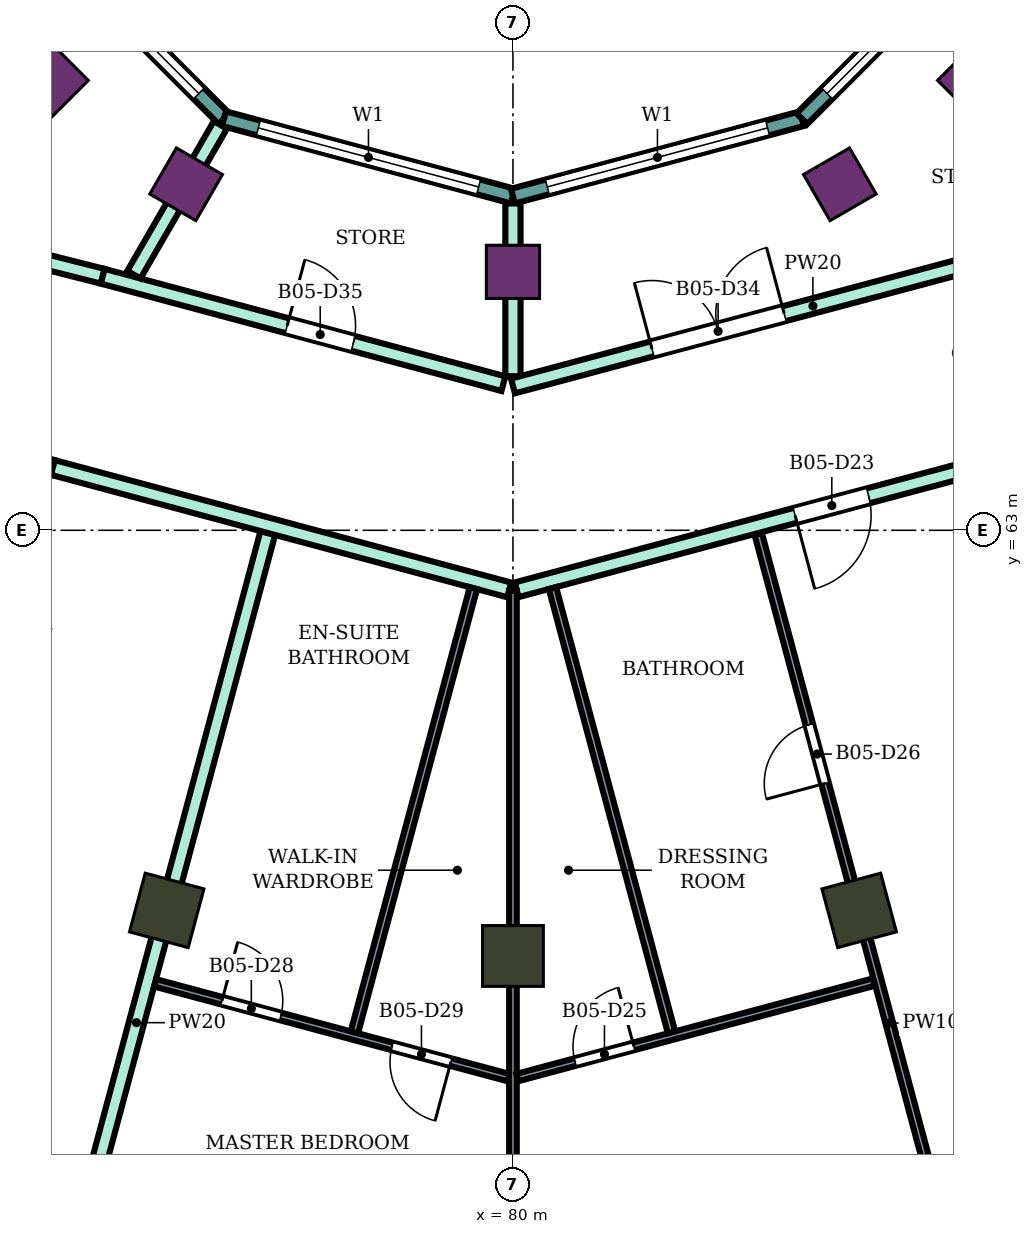
"""IFC4 building model, lengths in metres.
Left out: names, types, materials, properties, quantities, classifications, styles, units other than length and angle.
Written with IfcOpenShell. Run it as: python <this file> out.ifc"""

import sys

from ifc_helpers import new_model, si_unit, direction, frame, frame_2d, origin, origin_2d, place, context, subcontext, project, spatial, rectangle, extrude, element, fill, save


model = new_model("IFC4")
c1 = context("Model", 3, precision=1e-05, world=origin(), true_north=direction((0.0, 1.0)))
c2 = subcontext(c1, "Body", "Model", "MODEL_VIEW")
j1 = project(units=[si_unit("LENGTHUNIT", "METRE"), si_unit("PLANEANGLEUNIT", "RADIAN")], contexts=[c1])
p1 = place(None, origin())
s1 = spatial("IfcSite", under=j1, at=p1, CompositionType="ELEMENT")
p2 = place(p1, origin())
s2 = spatial("IfcBuilding", under=s1, at=p2, CompositionType="ELEMENT")
p3 = place(p2, frame((0.0, 0.0, 262.5)))
s3 = spatial("IfcBuildingStorey", under=s2, at=p3, CompositionType="ELEMENT", Elevation=262.5)
for number, where, z_axis, x_axis in (
    (1, (75.445, 58.0, 0.0), (0.0, 0.0, 1.0), (-0.259, -0.966, 0.0)),
    (2, (80.0, 57.4, 0.0), (0.0, 0.0, 1.0), (0.0, -1.0, 0.0)),
    (3, (84.555, 58.0, 0.0), (0.0, 0.0, 1.0), (0.259, -0.966, 0.0)),
):
    element("IfcColumn", number, at=place(p3, frame(where, z_axis=z_axis, x_axis=x_axis)), inside=s3, PredefinedType="COLUMN", context=c2, shape_type="SweptSolid", body=[
        extrude(rectangle(XDim=0.8, YDim=0.8, at=origin_2d()), origin(), (0.0, 0.0, 1.0), 4.2),
    ])
for number, where, z_axis, x_axis in (
    (4, (73.919, 68.919, 0.0), (0.0, 0.0, 1.0), (-0.707, -0.707, 0.0)),
    (5, (75.7, 67.552, 0.0), (0.0, 0.0, 1.0), (-0.5, -0.866, 0.0)),
    (6, (80.0, 66.4, 0.0), (0.0, 0.0, 1.0), (0.0, -1.0, 0.0)),
    (7, (84.3, 67.552, 0.0), (0.0, 0.0, 1.0), (0.5, -0.866, 0.0)),
    (8, (86.081, 68.919, 0.0), (0.0, 0.0, 1.0), (0.707, -0.707, 0.0)),
):
    element("IfcColumn", number, at=place(p3, frame(where, z_axis=z_axis, x_axis=x_axis)), inside=s3, PredefinedType="COLUMN", context=c2, shape_type="SweptSolid", body=[
        extrude(rectangle(XDim=0.7, YDim=0.7, at=origin_2d()), origin(), (0.0, 0.0, 1.0), 4.2),
    ])
p4 = place(p3, frame((73.415, 71.198, 0.0), z_axis=(0.0, 0.0, 1.0), x_axis=(0.707106781187, -0.707106781187, 0.0)))
e9 = element("IfcWall", 9, at=p4, inside=s3, PredefinedType="NOTDEFINED", context=c2, shape_type="SweptSolid", body=[
    extrude(rectangle(XDim=3.936, YDim=0.2, at=frame_2d((1.968, 0.0))), origin(), (0.0, 0.0, 1.0), 4.2),
])
p5 = place(p4, frame((0.468, 0.0, 0.9)))
e10 = element("IfcOpeningElement", 10, at=p5, cuts=e9, PredefinedType="OPENING", context=c2, shape_type="SweptSolid", body=[
    extrude(rectangle(XDim=3.0, YDim=2.3, at=frame_2d((1.5, 1.15))), frame((0.0, 0.11, 0.0), z_axis=(0.0, -1.0, 0.0), x_axis=(1.0, 0.0, 0.0)), (0.0, 0.0, 1.0), 0.22),
])
p6 = place(p3, frame((76.198, 68.415, 0.0), z_axis=(0.0, 0.0, 1.0), x_axis=(0.965933654434, -0.258789828301, 0.0)))
e11 = element("IfcWall", 11, at=p6, inside=s3, PredefinedType="NOTDEFINED", context=c2, shape_type="SweptSolid", body=[
    extrude(rectangle(XDim=3.936, YDim=0.2, at=frame_2d((1.968, 0.0))), origin(), (0.0, 0.0, 1.0), 4.2),
])
p7 = place(p6, frame((0.468, 0.0, 0.9)))
e12 = element("IfcOpeningElement", 12, at=p7, cuts=e11, PredefinedType="OPENING", context=c2, shape_type="SweptSolid", body=[
    extrude(rectangle(XDim=3.0, YDim=2.3, at=frame_2d((1.5, 1.15))), frame((0.0, 0.11, 0.0), z_axis=(0.0, -1.0, 0.0), x_axis=(1.0, 0.0, 0.0)), (0.0, 0.0, 1.0), 0.22),
])
p8 = place(p3, frame((80.0, 67.396, 0.0), z_axis=(0.0, 0.0, 1.0), x_axis=(0.965933654434, 0.258789828301, 0.0)))
e13 = element("IfcWall", 13, at=p8, inside=s3, PredefinedType="NOTDEFINED", context=c2, shape_type="SweptSolid", body=[
    extrude(rectangle(XDim=3.936, YDim=0.2, at=frame_2d((1.968, 0.0))), origin(), (0.0, 0.0, 1.0), 4.2),
])
p9 = place(p8, frame((0.468, 0.0, 0.9)))
e14 = element("IfcOpeningElement", 14, at=p9, cuts=e13, PredefinedType="OPENING", context=c2, shape_type="SweptSolid", body=[
    extrude(rectangle(XDim=3.0, YDim=2.3, at=frame_2d((1.5, 1.15))), frame((0.0, 0.11, 0.0), z_axis=(0.0, -1.0, 0.0), x_axis=(1.0, 0.0, 0.0)), (0.0, 0.0, 1.0), 0.22),
])
p10 = place(p3, frame((83.802, 68.415, 0.0), z_axis=(0.0, 0.0, 1.0), x_axis=(0.707106781187, 0.707106781187, 0.0)))
e15 = element("IfcWall", 15, at=p10, inside=s3, PredefinedType="NOTDEFINED", context=c2, shape_type="SweptSolid", body=[
    extrude(rectangle(XDim=3.936, YDim=0.2, at=frame_2d((1.968, 0.0))), origin(), (0.0, 0.0, 1.0), 4.2),
])
p11 = place(p10, frame((0.468, 0.0, 0.9)))
e16 = element("IfcOpeningElement", 16, at=p11, cuts=e15, PredefinedType="OPENING", context=c2, shape_type="SweptSolid", body=[
    extrude(rectangle(XDim=3.0, YDim=2.3, at=frame_2d((1.5, 1.15))), frame((0.0, 0.11, 0.0), z_axis=(0.0, -1.0, 0.0), x_axis=(1.0, 0.0, 0.0)), (0.0, 0.0, 1.0), 0.22),
])
p12 = place(p3, frame((68.2, 65.28, 0.0), z_axis=(0.0, 0.0, 1.0), x_axis=(0.969428528216, -0.245373854926, 0.0)))
e17 = element("IfcWall", 17, at=p12, inside=s3, PredefinedType="PARTITIONING", context=c2, shape_type="SweptSolid", body=[
    extrude(rectangle(XDim=5.928, YDim=0.2, at=frame_2d((2.964, 0.0))), origin(), (0.0, 0.0, 1.0), 3.75),
])
p13 = place(p12, frame((3.309, 0.0, 0.0)))
e18 = element("IfcOpeningElement", 18, at=p13, cuts=e17, PredefinedType="OPENING", context=c2, shape_type="SweptSolid", body=[
    extrude(rectangle(XDim=1.0, YDim=2.1, at=frame_2d((0.5, 1.05))), frame((0.0, 0.11, 0.0), z_axis=(0.0, -1.0, 0.0), x_axis=(1.0, 0.0, 0.0)), (0.0, 0.0, 1.0), 0.22),
])
p14 = place(p3, frame((72.1, 66.975, 0.0), z_axis=(0.0, 0.0, 1.0), x_axis=(0.969471314457, -0.245204752086, 0.0)))
e19 = element("IfcWall", 19, at=p14, inside=s3, PredefinedType="PARTITIONING", context=c2, shape_type="SweptSolid", body=[
    extrude(rectangle(XDim=2.582, YDim=0.2, at=frame_2d((1.291, 0.0))), origin(), (0.0, 0.0, 1.0), 3.75),
])
p15 = place(p14, frame((0.841, 0.0, 0.0)))
e20 = element("IfcOpeningElement", 20, at=p15, cuts=e19, PredefinedType="OPENING", context=c2, shape_type="SweptSolid", body=[
    extrude(rectangle(XDim=0.9, YDim=2.1, at=frame_2d((0.45, 1.05))), frame((0.0, 0.11, 0.0), z_axis=(0.0, -1.0, 0.0), x_axis=(1.0, 0.0, 0.0)), (0.0, 0.0, 1.0), 0.22),
])
p16 = place(p3, frame((73.32, 50.082, 0.0), z_axis=(0.0, 0.0, 1.0), x_axis=(0.258966962665, 0.965886179758, 0.0)))
e21 = element("IfcWall", 21, at=p16, inside=s3, PredefinedType="PARTITIONING", context=c2, shape_type="SweptSolid", body=[
    extrude(rectangle(XDim=13.337, YDim=0.2, at=frame_2d((6.668, 0.0))), origin(), (0.0, 0.0, 1.0), 3.75),
])
p17 = place(p3, frame((73.947, 63.826, 0.0), z_axis=(0.0, 0.0, 1.0), x_axis=(0.965856500469, -0.259077634122, 0.0)))
e22 = element("IfcWall", 22, at=p17, inside=s3, PredefinedType="PARTITIONING", context=c2, shape_type="SweptSolid", body=[
    extrude(rectangle(XDim=6.217, YDim=0.2, at=frame_2d((3.108, 0.0))), origin(), (0.0, 0.0, 1.0), 3.75),
])
p18 = place(p3, frame((74.603, 66.342, 0.0), z_axis=(0.0, 0.0, 1.0), x_axis=(0.965920893652, -0.258837453254, 0.0)))
e23 = element("IfcWall", 23, at=p18, inside=s3, PredefinedType="PARTITIONING", context=c2, shape_type="SweptSolid", body=[
    extrude(rectangle(XDim=5.458, YDim=0.2, at=frame_2d((2.729, 0.0))), origin(), (0.0, 0.0, 1.0), 3.75),
])
p19 = place(p18, frame((2.512, 0.0, 0.0)))
e24 = element("IfcOpeningElement", 24, at=p19, cuts=e23, PredefinedType="OPENING", context=c2, shape_type="SweptSolid", body=[
    extrude(rectangle(XDim=0.9, YDim=2.1, at=frame_2d((0.45, 1.05))), frame((0.0, 0.11, 0.0), z_axis=(0.0, -1.0, 0.0), x_axis=(1.0, 0.0, 0.0)), (0.0, 0.0, 1.0), 0.22),
])
p20 = place(p3, frame((75.013, 66.363, 0.0), z_axis=(0.0, 0.0, 1.0), x_axis=(0.500097042406, 0.865969369075, 0.0)))
e25 = element("IfcWall", 25, at=p20, inside=s3, PredefinedType="PARTITIONING", context=c2, shape_type="SweptSolid", body=[
    extrude(rectangle(XDim=2.275, YDim=0.2, at=frame_2d((1.138, 0.0))), origin(), (0.0, 0.0, 1.0), 3.75),
])
p21 = place(p3, frame((80.048, 62.217, 0.0), z_axis=(0.0, 0.0, 1.0), x_axis=(0.966097920642, 0.258175923996, 0.0)))
e26 = element("IfcWall", 26, at=p21, inside=s3, PredefinedType="PARTITIONING", context=c2, shape_type="SweptSolid", body=[
    extrude(rectangle(XDim=6.217, YDim=0.2, at=frame_2d((3.108, 0.0))), origin(), (0.0, 0.0, 1.0), 3.75),
])
p22 = place(p21, frame((3.792, 0.0, 0.0)))
e27 = element("IfcOpeningElement", 27, at=p22, cuts=e26, PredefinedType="OPENING", context=c2, shape_type="SweptSolid", body=[
    extrude(rectangle(XDim=1.0, YDim=2.1, at=frame_2d((0.5, 1.05))), frame((0.0, 0.11, 0.0), z_axis=(0.0, -1.0, 0.0), x_axis=(1.0, 0.0, 0.0)), (0.0, 0.0, 1.0), 0.22),
])
p23 = place(p3, frame((80.0, 65.027, 0.0), z_axis=(0.0, 0.0, 1.0), x_axis=(0.0, 1.0, 0.0)))
e28 = element("IfcWall", 28, at=p23, inside=s3, PredefinedType="PARTITIONING", context=c2, shape_type="SweptSolid", body=[
    extrude(rectangle(XDim=2.273, YDim=0.2, at=frame_2d((1.136, 0.0))), origin(), (0.0, 0.0, 1.0), 3.75),
])
p24 = place(p3, frame((80.0, 64.898, 0.0), z_axis=(0.0, 0.0, 1.0), x_axis=(0.966236923997, 0.25765520896, 0.0)))
e29 = element("IfcWall", 29, at=p24, inside=s3, PredefinedType="PARTITIONING", context=c2, shape_type="SweptSolid", body=[
    extrude(rectangle(XDim=8.168, YDim=0.2, at=frame_2d((4.084, 0.0))), origin(), (0.0, 0.0, 1.0), 3.75),
])
p25 = place(p24, frame((1.893, 0.0, 0.0)))
e30 = element("IfcOpeningElement", 30, at=p25, cuts=e29, PredefinedType="OPENING", context=c2, shape_type="SweptSolid", body=[
    extrude(rectangle(XDim=1.8, YDim=2.1, at=frame_2d((0.9, 1.05))), frame((0.0, 0.11, 0.0), z_axis=(0.0, -1.0, 0.0), x_axis=(1.0, 0.0, 0.0)), (0.0, 0.0, 1.0), 0.22),
])
p26 = place(p3, frame((75.293, 57.046, 0.0), z_axis=(0.0, 0.0, 1.0), x_axis=(0.965904119246, -0.258900043306, 0.0)))
e31 = element("IfcWall", 31, at=p26, inside=s3, PredefinedType="PARTITIONING", context=c2, shape_type="SweptSolid", body=[
    extrude(rectangle(XDim=4.813, YDim=0.1, at=frame_2d((2.406, 0.0))), origin(), (0.0, 0.0, 1.0), 3.75),
])
p27 = place(p26, frame((0.91, 0.0, 0.0)))
e32 = element("IfcOpeningElement", 32, at=p27, cuts=e31, PredefinedType="OPENING", context=c2, shape_type="SweptSolid", body=[
    extrude(rectangle(XDim=0.8, YDim=2.1, at=frame_2d((0.4, 1.05))), frame((0.0, 0.06, 0.0), z_axis=(0.0, -1.0, 0.0), x_axis=(1.0, 0.0, 0.0)), (0.0, 0.0, 1.0), 0.12),
])
p28 = place(p26, frame((3.227, 0.0, 0.0)))
e33 = element("IfcOpeningElement", 33, at=p28, cuts=e31, PredefinedType="OPENING", context=c2, shape_type="SweptSolid", body=[
    extrude(rectangle(XDim=0.8, YDim=2.1, at=frame_2d((0.4, 1.05))), frame((0.0, 0.06, 0.0), z_axis=(0.0, -1.0, 0.0), x_axis=(1.0, 0.0, 0.0)), (0.0, 0.0, 1.0), 0.12),
])
p29 = place(p3, frame((77.914, 56.396, 0.0), z_axis=(0.0, 0.0, 1.0), x_axis=(0.258822816874, 0.965924815638, 0.0)))
e34 = element("IfcWall", 34, at=p29, inside=s3, PredefinedType="PARTITIONING", context=c2, shape_type="SweptSolid", body=[
    extrude(rectangle(XDim=6.05, YDim=0.1, at=frame_2d((3.025, 0.0))), origin(), (0.0, 0.0, 1.0), 3.75),
])
p30 = place(p3, frame((80.0, 51.8, 0.0), z_axis=(0.0, 0.0, 1.0), x_axis=(0.0, 1.0, 0.0)))
e35 = element("IfcWall", 35, at=p30, inside=s3, PredefinedType="PARTITIONING", context=c2, shape_type="SweptSolid", body=[
    extrude(rectangle(XDim=10.404, YDim=0.1, at=frame_2d((5.202, 0.0))), origin(), (0.0, 0.0, 1.0), 3.75),
])
p31 = place(p30, frame((1.718, 0.0, 0.0)))
e36 = element("IfcOpeningElement", 36, at=p31, cuts=e35, PredefinedType="OPENING", context=c2, shape_type="SweptSolid", body=[
    extrude(rectangle(XDim=0.9, YDim=2.1, at=frame_2d((0.45, 1.05))), frame((0.0, 0.06, 0.0), z_axis=(0.0, -1.0, 0.0), x_axis=(1.0, 0.0, 0.0)), (0.0, 0.0, 1.0), 0.12),
])
p32 = place(p3, frame((80.058, 55.801, 0.0), z_axis=(0.0, 0.0, 1.0), x_axis=(0.965968926881, 0.258658137896, 0.0)))
e37 = element("IfcWall", 37, at=p32, inside=s3, PredefinedType="PARTITIONING", context=c2, shape_type="SweptSolid", body=[
    extrude(rectangle(XDim=4.854, YDim=0.1, at=frame_2d((2.427, 0.0))), origin(), (0.0, 0.0, 1.0), 3.75),
])
p33 = place(p32, frame((0.786, 0.0, 0.0)))
e38 = element("IfcOpeningElement", 38, at=p33, cuts=e37, PredefinedType="OPENING", context=c2, shape_type="SweptSolid", body=[
    extrude(rectangle(XDim=0.8, YDim=2.1, at=frame_2d((0.4, 1.05))), frame((0.0, 0.06, 0.0), z_axis=(0.0, -1.0, 0.0), x_axis=(1.0, 0.0, 0.0)), (0.0, 0.0, 1.0), 0.12),
])
p34 = place(p3, frame((80.52, 62.24, 0.0), z_axis=(0.0, 0.0, 1.0), x_axis=(0.258822816874, -0.965924815638, 0.0)))
e39 = element("IfcWall", 39, at=p34, inside=s3, PredefinedType="PARTITIONING", context=c2, shape_type="SweptSolid", body=[
    extrude(rectangle(XDim=6.05, YDim=0.1, at=frame_2d((3.025, 0.0))), origin(), (0.0, 0.0, 1.0), 3.75),
])
p35 = place(p3, frame((83.226, 62.954, 0.0), z_axis=(0.0, 0.0, 1.0), x_axis=(0.258737611245, -0.965947642746, 0.0)))
e40 = element("IfcWall", 40, at=p35, inside=s3, PredefinedType="PARTITIONING", context=c2, shape_type="SweptSolid", body=[
    extrude(rectangle(XDim=13.328, YDim=0.1, at=frame_2d((6.664, 0.0))), origin(), (0.0, 0.0, 1.0), 3.75),
])
p36 = place(p35, frame((9.634, 0.0, 0.0)))
e41 = element("IfcOpeningElement", 41, at=p36, cuts=e40, PredefinedType="OPENING", context=c2, shape_type="SweptSolid", body=[
    extrude(rectangle(XDim=0.9, YDim=2.1, at=frame_2d((0.45, 1.05))), frame((0.0, 0.06, 0.0), z_axis=(0.0, -1.0, 0.0), x_axis=(1.0, 0.0, 0.0)), (0.0, 0.0, 1.0), 0.12),
])
p37 = place(p35, frame((2.6, 0.0, 0.0)))
e42 = element("IfcOpeningElement", 42, at=p37, cuts=e40, PredefinedType="OPENING", context=c2, shape_type="SweptSolid", body=[
    extrude(rectangle(XDim=0.8, YDim=2.1, at=frame_2d((0.4, 1.05))), frame((0.0, 0.06, 0.0), z_axis=(0.0, -1.0, 0.0), x_axis=(1.0, 0.0, 0.0)), (0.0, 0.0, 1.0), 0.12),
])
p38 = place(p5, origin())
e43 = element("IfcWindow", 43, at=p38, inside=s3, PartitioningType="SINGLE_PANEL", PredefinedType="WINDOW", context=c2, shape_type="SweptSolid", body=[
    extrude(rectangle(XDim=3.0, YDim=2.3, at=frame_2d((1.5, 1.15))), frame((0.0, 0.03, 0.0), z_axis=(0.0, -1.0, 0.0), x_axis=(1.0, 0.0, 0.0)), (0.0, 0.0, 1.0), 0.06),
])
fill(e10, e43)
p39 = place(p7, origin())
e44 = element("IfcWindow", 44, at=p39, inside=s3, PartitioningType="SINGLE_PANEL", PredefinedType="WINDOW", context=c2, shape_type="SweptSolid", body=[
    extrude(rectangle(XDim=3.0, YDim=2.3, at=frame_2d((1.5, 1.15))), frame((0.0, 0.03, 0.0), z_axis=(0.0, -1.0, 0.0), x_axis=(1.0, 0.0, 0.0)), (0.0, 0.0, 1.0), 0.06),
])
fill(e12, e44)
p40 = place(p9, origin())
e45 = element("IfcWindow", 45, at=p40, inside=s3, PartitioningType="SINGLE_PANEL", PredefinedType="WINDOW", context=c2, shape_type="SweptSolid", body=[
    extrude(rectangle(XDim=3.0, YDim=2.3, at=frame_2d((1.5, 1.15))), frame((0.0, 0.03, 0.0), z_axis=(0.0, -1.0, 0.0), x_axis=(1.0, 0.0, 0.0)), (0.0, 0.0, 1.0), 0.06),
])
fill(e14, e45)
p41 = place(p11, origin())
e46 = element("IfcWindow", 46, at=p41, inside=s3, PartitioningType="SINGLE_PANEL", PredefinedType="WINDOW", context=c2, shape_type="SweptSolid", body=[
    extrude(rectangle(XDim=3.0, YDim=2.3, at=frame_2d((1.5, 1.15))), frame((0.0, 0.03, 0.0), z_axis=(0.0, -1.0, 0.0), x_axis=(1.0, 0.0, 0.0)), (0.0, 0.0, 1.0), 0.06),
])
fill(e16, e46)
p42 = place(p22, frame((1.0, 0.0, 0.0), z_axis=(0.0, 0.0, 1.0), x_axis=(-1.0, 0.0, 0.0)))
e47 = element("IfcDoor", 47, at=p42, inside=s3, OperationType="SINGLE_SWING_RIGHT", PredefinedType="DOOR", context=c2, shape_type="SweptSolid", body=[
    extrude(rectangle(XDim=1.0, YDim=2.1, at=frame_2d((0.5, 1.05))), frame((0.0, 0.025, 0.0), z_axis=(0.0, -1.0, 0.0), x_axis=(1.0, 0.0, 0.0)), (0.0, 0.0, 1.0), 0.05),
])
fill(e27, e47)
p43 = place(p33, origin())
e48 = element("IfcDoor", 48, at=p43, inside=s3, OperationType="SINGLE_SWING_RIGHT", PredefinedType="DOOR", context=c2, shape_type="SweptSolid", body=[
    extrude(rectangle(XDim=0.8, YDim=2.1, at=frame_2d((0.4, 1.05))), frame((0.0, 0.025, 0.0), z_axis=(0.0, -1.0, 0.0), x_axis=(1.0, 0.0, 0.0)), (0.0, 0.0, 1.0), 0.05),
])
fill(e38, e48)
p44 = place(p37, frame((0.8, 0.0, 0.0), z_axis=(0.0, 0.0, 1.0), x_axis=(-1.0, 0.0, 0.0)))
e49 = element("IfcDoor", 49, at=p44, inside=s3, OperationType="SINGLE_SWING_LEFT", PredefinedType="DOOR", context=c2, shape_type="SweptSolid", body=[
    extrude(rectangle(XDim=0.8, YDim=2.1, at=frame_2d((0.4, 1.05))), frame((0.0, 0.025, 0.0), z_axis=(0.0, -1.0, 0.0), x_axis=(1.0, 0.0, 0.0)), (0.0, 0.0, 1.0), 0.05),
])
fill(e42, e49)
p45 = place(p27, origin())
e50 = element("IfcDoor", 50, at=p45, inside=s3, OperationType="SINGLE_SWING_LEFT", PredefinedType="DOOR", context=c2, shape_type="SweptSolid", body=[
    extrude(rectangle(XDim=0.8, YDim=2.1, at=frame_2d((0.4, 1.05))), frame((0.0, 0.025, 0.0), z_axis=(0.0, -1.0, 0.0), x_axis=(1.0, 0.0, 0.0)), (0.0, 0.0, 1.0), 0.05),
])
fill(e32, e50)
p46 = place(p28, frame((0.8, 0.0, 0.0), z_axis=(0.0, 0.0, 1.0), x_axis=(-1.0, 0.0, 0.0)))
e51 = element("IfcDoor", 51, at=p46, inside=s3, OperationType="SINGLE_SWING_LEFT", PredefinedType="DOOR", context=c2, shape_type="SweptSolid", body=[
    extrude(rectangle(XDim=0.8, YDim=2.1, at=frame_2d((0.4, 1.05))), frame((0.0, 0.025, 0.0), z_axis=(0.0, -1.0, 0.0), x_axis=(1.0, 0.0, 0.0)), (0.0, 0.0, 1.0), 0.05),
])
fill(e33, e51)
p47 = place(p25, origin())
e52 = element("IfcDoor", 52, at=p47, inside=s3, OperationType="DOUBLE_DOOR_SINGLE_SWING", PredefinedType="DOOR", context=c2, shape_type="SweptSolid", body=[
    extrude(rectangle(XDim=1.8, YDim=2.1, at=frame_2d((0.9, 1.05))), frame((0.0, 0.025, 0.0), z_axis=(0.0, -1.0, 0.0), x_axis=(1.0, 0.0, 0.0)), (0.0, 0.0, 1.0), 0.05),
])
fill(e30, e52)
p48 = place(p19, origin())
e53 = element("IfcDoor", 53, at=p48, inside=s3, OperationType="SINGLE_SWING_LEFT", PredefinedType="DOOR", context=c2, shape_type="SweptSolid", body=[
    extrude(rectangle(XDim=0.9, YDim=2.1, at=frame_2d((0.45, 1.05))), frame((0.0, 0.025, 0.0), z_axis=(0.0, -1.0, 0.0), x_axis=(1.0, 0.0, 0.0)), (0.0, 0.0, 1.0), 0.05),
])
fill(e24, e53)
save(model, sys.argv[1])
